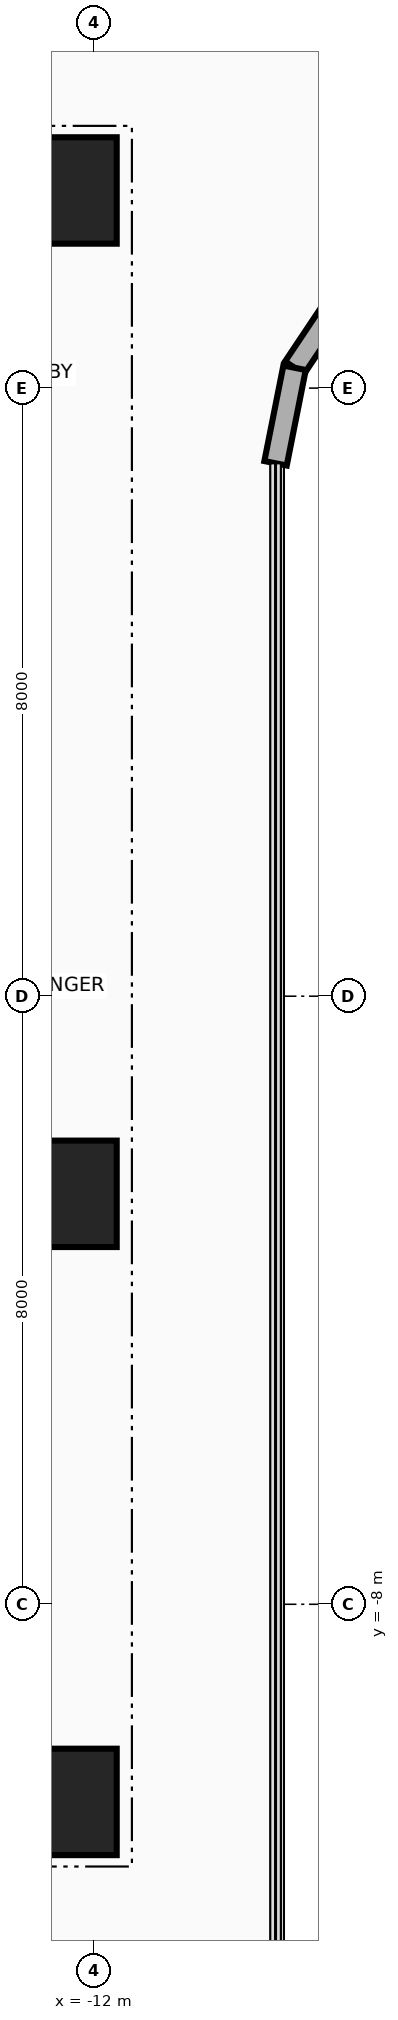
"""IFC4 building model, lengths in metres.
Left out: names, types, materials, properties, quantities, classifications, styles, units other than length and angle.
Written with IfcOpenShell. Run it as: python <this file> out.ifc"""

import sys

from ifc_helpers import new_model, si_unit, direction, frame, frame_2d, origin, origin_2d, place, context, subcontext, project, spatial, rectangle, extrude, source, transform, mapped, element, save


model = new_model("IFC4")
c1 = context("Model", 3, precision=1e-05, world=origin(), true_north=direction((0.0, 1.0)))
c2 = subcontext(c1, "Body", "Model", "MODEL_VIEW")
j1 = project(units=[si_unit("LENGTHUNIT", "METRE"), si_unit("PLANEANGLEUNIT", "RADIAN")], contexts=[c1])
p1 = place(None, origin())
s1 = spatial("IfcSite", under=j1, at=p1, CompositionType="ELEMENT")
p2 = place(p1, origin())
s2 = spatial("IfcBuilding", under=s1, at=p2, CompositionType="ELEMENT")
p3 = place(p2, frame((0.0, 0.0, 74.1)))
s3 = spatial("IfcBuildingStorey", under=s2, at=p3, CompositionType="ELEMENT", Elevation=74.1)
for number, where, z_axis, x_axis in (
    (1, (-22.65, 10.8, 0.0), (0.0, 0.0, 1.0), (1.0, 0.0, 0.0)),
    (2, (-22.65, -10.8, 0.0), (0.0, 0.0, 1.0), (1.0, 0.0, 0.0)),
):
    element("IfcWall", number, at=place(p3, frame(where, z_axis=z_axis, x_axis=x_axis)), inside=s3, PredefinedType="SHEAR", context=c2, shape_type="SweptSolid", body=[
        extrude(rectangle(XDim=10.25, YDim=0.7, at=frame_2d((5.125, 0.0))), origin(), (0.0, 0.0, 1.0), 3.46),
    ])
m1 = source(origin(), c2, "Body", "SweptSolid", [
    extrude(rectangle(XDim=1.4, YDim=1.4, at=origin_2d()), origin(), (0.0, 0.0, 1.0), 3.7),
])
for number, where, z_axis, x_axis in (
    (3, (-12.4, -10.6, 0.0), (0.0, 0.0, 1.0), (1.0, 0.0, 0.0)),
    (4, (-12.4, -2.6, 0.0), (0.0, 0.0, 1.0), (1.0, 0.0, 0.0)),
    (5, (-12.4, 10.6, 0.0), (0.0, 0.0, 1.0), (1.0, 0.0, 0.0)),
):
    element("IfcColumn", number, at=place(p3, frame(where, z_axis=z_axis, x_axis=x_axis)), inside=s3, PredefinedType="COLUMN", context=c2, shape_type="MappedRepresentation", body=[
        mapped(m1, transform((0.0, 0.0, 0.0), x_axis=(1.0, 0.0, 0.0), y_axis=(0.0, 1.0, 0.0), z_axis=(0.0, 0.0, 1.0), scale=1.0)),
    ])
p4 = place(p3, frame((-8.642, 9.342, 0.0), z_axis=(0.0, 0.0, 1.0), x_axis=(-0.555615398575, -0.831439431869, 0.0)))
e6 = element("IfcWall", 6, at=p4, inside=s3, PredefinedType="SOLIDWALL", context=c2, shape_type="SweptSolid", body=[
    extrude(rectangle(XDim=1.292, YDim=0.3, at=frame_2d((0.646, 0.0))), origin(), (0.0, 0.0, 1.0), 3.46),
])
p5 = place(p3, frame((-9.36, 8.268, 0.0), z_axis=(0.0, 0.0, 1.0), x_axis=(-0.195090163074, -0.980785312019, 0.0)))
e7 = element("IfcWall", 7, at=p5, inside=s3, PredefinedType="SOLIDWALL", context=c2, shape_type="SweptSolid", body=[
    extrude(rectangle(XDim=1.281, YDim=0.3, at=frame_2d((0.641, 0.0))), origin(), (0.0, 0.0, 1.0), 3.46),
])
save(model, sys.argv[1])
